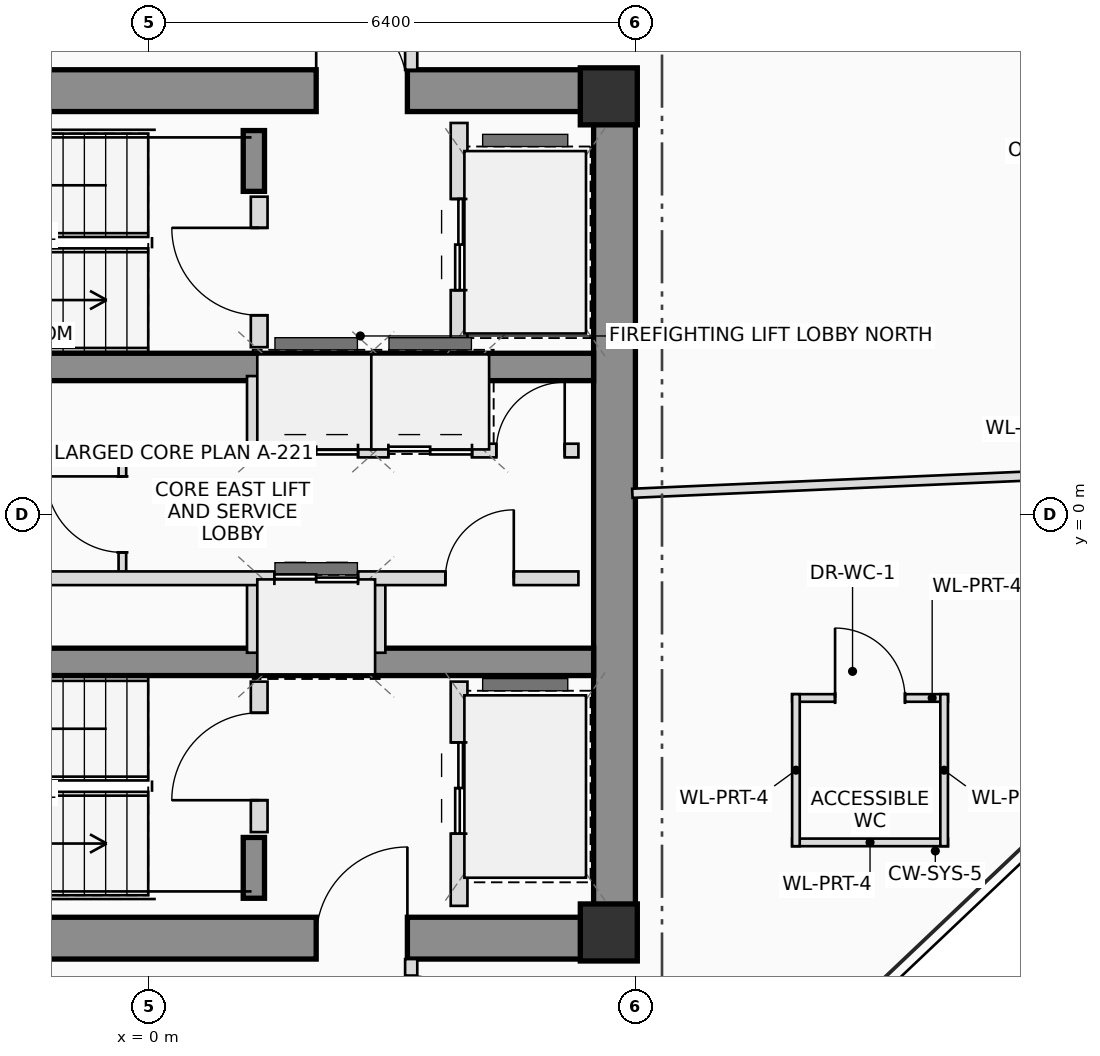
"""IFC4 building model, lengths in metres.
Left out: names, types, materials, properties, quantities, classifications, styles, units other than length and angle.
Written with IfcOpenShell. Run it as: python <this file> out.ifc"""

import sys

from ifc_helpers import new_model, si_unit, direction, frame, frame_2d, origin, origin_2d, place, context, subcontext, project, spatial, rectangle, extrude, source, transform, mapped, element, fill, save


model = new_model("IFC4")
c1 = context("Model", 3, precision=1e-05, world=origin(), true_north=direction((0.0, 1.0)))
c2 = subcontext(c1, "Body", "Model", "MODEL_VIEW")
j1 = project(units=[si_unit("LENGTHUNIT", "METRE"), si_unit("PLANEANGLEUNIT", "RADIAN")], contexts=[c1])
p1 = place(None, origin())
s1 = spatial("IfcSite", under=j1, at=p1, CompositionType="ELEMENT")
p2 = place(p1, origin())
s2 = spatial("IfcBuilding", under=s1, at=p2, CompositionType="ELEMENT")
p3 = place(p2, frame((0.0, 0.0, 224.15)))
s3 = spatial("IfcBuildingStorey", under=s2, at=p3, CompositionType="ELEMENT", Elevation=224.15)
m1 = source(origin(), c2, "Body", "SweptSolid", [
    extrude(rectangle(XDim=0.75, YDim=0.75, at=origin_2d()), origin(), (0.0, 0.0, 1.0), 4.5),
])
for number, where, z_axis, x_axis in (
    (1, (6.05, -5.5, 0.0), (0.0, 0.0, 1.0), (1.0, 0.0, 0.0)),
    (2, (6.05, 5.5, 0.0), (0.0, 0.0, 1.0), (1.0, 0.0, 0.0)),
):
    element("IfcColumn", number, at=place(p3, frame(where, z_axis=z_axis, x_axis=x_axis)), inside=s3, PredefinedType="COLUMN", context=c2, shape_type="MappedRepresentation", body=[
        mapped(m1, transform((0.0, 0.0, 0.0), scale=1.0)),
    ])
p4 = place(p3, frame((-6.4, 5.575, 0.0), z_axis=(0.0, 0.0, 1.0), x_axis=(1.0, 0.0, 0.0)))
e3 = element("IfcWall", 3, at=p4, inside=s3, PredefinedType="SHEAR", context=c2, shape_type="SweptSolid", body=[
    extrude(rectangle(XDim=12.8, YDim=0.55, at=frame_2d((6.4, 0.0))), origin(), (0.0, 0.0, 1.0), 4.5),
])
p5 = place(p4, frame((8.6, 0.0, 0.0)))
e4 = element("IfcOpeningElement", 4, at=p5, cuts=e3, PredefinedType="OPENING", context=c2, shape_type="SweptSolid", body=[
    extrude(rectangle(XDim=1.2, YDim=2.2, at=frame_2d((0.6, 1.1))), frame((0.0, 0.285, 0.0), z_axis=(0.0, -1.0, 0.0), x_axis=(1.0, 0.0, 0.0)), (0.0, 0.0, 1.0), 0.57),
])
p6 = place(p3, frame((-6.4, -5.575, 0.0), z_axis=(0.0, 0.0, 1.0), x_axis=(1.0, 0.0, 0.0)))
e5 = element("IfcWall", 5, at=p6, inside=s3, PredefinedType="SHEAR", context=c2, shape_type="SweptSolid", body=[
    extrude(rectangle(XDim=12.8, YDim=0.55, at=frame_2d((6.4, 0.0))), origin(), (0.0, 0.0, 1.0), 4.5),
])
p7 = place(p6, frame((8.6, 0.0, 0.0)))
e6 = element("IfcOpeningElement", 6, at=p7, cuts=e5, PredefinedType="OPENING", context=c2, shape_type="SweptSolid", body=[
    extrude(rectangle(XDim=1.2, YDim=2.2, at=frame_2d((0.6, 1.1))), frame((0.0, 0.285, 0.0), z_axis=(0.0, -1.0, 0.0), x_axis=(1.0, 0.0, 0.0)), (0.0, 0.0, 1.0), 0.57),
])
p8 = place(p3, frame((6.125, -5.3, 0.0), z_axis=(0.0, 0.0, 1.0), x_axis=(0.0, 1.0, 0.0)))
e7 = element("IfcWall", 7, at=p8, inside=s3, PredefinedType="SHEAR", context=c2, shape_type="SweptSolid", body=[
    extrude(rectangle(XDim=10.6, YDim=0.55, at=frame_2d((5.3, 0.0))), origin(), (0.0, 0.0, 1.0), 4.5),
])
for number, where, z_axis, x_axis in (
    (8, (-5.85, 1.94, 0.0), (0.0, 0.0, 1.0), (1.0, 0.0, 0.0)),
    (9, (-5.85, -1.94, 0.0), (0.0, 0.0, 1.0), (1.0, 0.0, 0.0)),
):
    element("IfcWall", number, at=place(p3, frame(where, z_axis=z_axis, x_axis=x_axis)), inside=s3, PredefinedType="SHEAR", context=c2, shape_type="SweptSolid", body=[
        extrude(rectangle(XDim=11.7, YDim=0.36, at=frame_2d((5.85, 0.0))), origin(), (0.0, 0.0, 1.0), 4.5),
    ])
for number, where, z_axis, x_axis in (
    (10, (1.38, 4.25, 0.0), (0.0, 0.0, 1.0), (0.0, 1.0, 0.0)),
    (11, (1.38, -5.05, 0.0), (0.0, 0.0, 1.0), (0.0, 1.0, 0.0)),
):
    element("IfcWall", number, at=place(p3, frame(where, z_axis=z_axis, x_axis=x_axis)), inside=s3, PredefinedType="SHEAR", context=c2, shape_type="SweptSolid", body=[
        extrude(rectangle(XDim=0.8, YDim=0.28, at=frame_2d((0.4, 0.0))), origin(), (0.0, 0.0, 1.0), 4.5),
    ])
p9 = place(p3, frame((1.45, 2.2, 0.0), z_axis=(0.0, 0.0, 1.0), x_axis=(0.0, 1.0, 0.0)))
e12 = element("IfcWall", 12, at=p9, inside=s3, PredefinedType="PLUMBINGWALL", context=c2, shape_type="SweptSolid", body=[
    extrude(rectangle(XDim=1.98, YDim=0.22, at=frame_2d((0.99, 0.0))), origin(), (0.0, 0.0, 1.0), 4.3),
])
p10 = place(p9, frame((0.42, 0.0, 0.0)))
e13 = element("IfcOpeningElement", 13, at=p10, cuts=e12, PredefinedType="OPENING", context=c2, shape_type="SweptSolid", body=[
    extrude(rectangle(XDim=1.15, YDim=2.15, at=frame_2d((0.575, 1.075))), frame((0.0, 0.12, 0.0), z_axis=(0.0, -1.0, 0.0), x_axis=(1.0, 0.0, 0.0)), (0.0, 0.0, 1.0), 0.24),
])
p11 = place(p3, frame((4.08, 2.2, 0.0), z_axis=(0.0, 0.0, 1.0), x_axis=(0.0, 1.0, 0.0)))
e14 = element("IfcWall", 14, at=p11, inside=s3, PredefinedType="PLUMBINGWALL", context=c2, shape_type="SweptSolid", body=[
    extrude(rectangle(XDim=2.95, YDim=0.22, at=frame_2d((1.475, 0.0))), origin(), (0.0, 0.0, 1.0), 4.3),
])
p12 = place(p11, frame((0.75, 0.0, 0.0)))
e15 = element("IfcOpeningElement", 15, at=p12, cuts=e14, PredefinedType="OPENING", context=c2, shape_type="SweptSolid", body=[
    extrude(rectangle(XDim=1.2, YDim=2.25, at=frame_2d((0.6, 1.125))), frame((0.0, 0.12, 0.0), z_axis=(0.0, -1.0, 0.0), x_axis=(1.0, 0.0, 0.0)), (0.0, 0.0, 1.0), 0.24),
])
p13 = place(p3, frame((1.45, -4.18, 0.0), z_axis=(0.0, 0.0, 1.0), x_axis=(0.0, 1.0, 0.0)))
e16 = element("IfcWall", 16, at=p13, inside=s3, PredefinedType="PLUMBINGWALL", context=c2, shape_type="SweptSolid", body=[
    extrude(rectangle(XDim=1.98, YDim=0.22, at=frame_2d((0.99, 0.0))), origin(), (0.0, 0.0, 1.0), 4.3),
])
p14 = place(p13, frame((0.42, 0.0, 0.0)))
e17 = element("IfcOpeningElement", 17, at=p14, cuts=e16, PredefinedType="OPENING", context=c2, shape_type="SweptSolid", body=[
    extrude(rectangle(XDim=1.15, YDim=2.15, at=frame_2d((0.575, 1.075))), frame((0.0, 0.12, 0.0), z_axis=(0.0, -1.0, 0.0), x_axis=(1.0, 0.0, 0.0)), (0.0, 0.0, 1.0), 0.24),
])
p15 = place(p3, frame((4.08, -5.15, 0.0), z_axis=(0.0, 0.0, 1.0), x_axis=(0.0, 1.0, 0.0)))
e18 = element("IfcWall", 18, at=p15, inside=s3, PredefinedType="PLUMBINGWALL", context=c2, shape_type="SweptSolid", body=[
    extrude(rectangle(XDim=2.95, YDim=0.22, at=frame_2d((1.475, 0.0))), origin(), (0.0, 0.0, 1.0), 4.3),
])
p16 = place(p15, frame((0.95, 0.0, 0.0)))
e19 = element("IfcOpeningElement", 19, at=p16, cuts=e18, PredefinedType="OPENING", context=c2, shape_type="SweptSolid", body=[
    extrude(rectangle(XDim=1.2, YDim=2.25, at=frame_2d((0.6, 1.125))), frame((0.0, 0.12, 0.0), z_axis=(0.0, -1.0, 0.0), x_axis=(1.0, 0.0, 0.0)), (0.0, 0.0, 1.0), 0.24),
])
p17 = place(p3, frame((-0.35, -0.84, 0.0), z_axis=(0.0, 0.0, 1.0), x_axis=(0.0, 1.0, 0.0)))
e20 = element("IfcWall", 20, at=p17, inside=s3, PredefinedType="PARTITIONING", context=c2, shape_type="SweptSolid", body=[
    extrude(rectangle(XDim=1.68, YDim=0.1, at=frame_2d((0.84, 0.0))), origin(), (0.0, 0.0, 1.0), 4.3),
])
p18 = place(p17, frame((0.34, 0.0, 0.0)))
e21 = element("IfcOpeningElement", 21, at=p18, cuts=e20, PredefinedType="OPENING", context=c2, shape_type="SweptSolid", body=[
    extrude(rectangle(XDim=1.0, YDim=2.25, at=frame_2d((0.5, 1.125))), frame((0.0, 0.06, 0.0), z_axis=(0.0, -1.0, 0.0), x_axis=(1.0, 0.0, 0.0)), (0.0, 0.0, 1.0), 0.12),
])
for number, where, z_axis, x_axis in (
    (22, (1.38, 0.84, 0.0), (0.0, 0.0, 1.0), (0.0, 1.0, 0.0)),
    (23, (1.38, -1.82, 0.0), (0.0, 0.0, 1.0), (0.0, 1.0, 0.0)),
    (24, (3.02, 0.84, 0.0), (0.0, 0.0, 1.0), (0.0, 1.0, 0.0)),
    (25, (4.38, 0.84, 0.0), (0.0, 0.0, 1.0), (0.0, 1.0, 0.0)),
    (26, (3.02, -1.82, 0.0), (0.0, 0.0, 1.0), (0.0, 1.0, 0.0)),
):
    element("IfcWall", number, at=place(p3, frame(where, z_axis=z_axis, x_axis=x_axis)), inside=s3, PredefinedType="PLUMBINGWALL", context=c2, shape_type="SweptSolid", body=[
        extrude(rectangle(XDim=0.98, YDim=0.18, at=frame_2d((0.49, 0.0))), origin(), (0.0, 0.0, 1.0), 4.3),
    ])
p19 = place(p3, frame((-5.68, 0.84, 0.0), z_axis=(0.0, 0.0, 1.0), x_axis=(1.0, 0.0, 0.0)))
e27 = element("IfcWall", 27, at=p19, inside=s3, PredefinedType="PLUMBINGWALL", context=c2, shape_type="SweptSolid", body=[
    extrude(rectangle(XDim=11.33, YDim=0.18, at=frame_2d((5.665, 0.0))), origin(), (0.0, 0.0, 1.0), 4.3),
])
p20 = place(p19, frame((3.13, 0.0, 0.0)))
e28 = element("IfcOpeningElement", 28, at=p20, cuts=e27, PredefinedType="OPENING", context=c2, shape_type="SweptSolid", body=[
    extrude(rectangle(XDim=0.9, YDim=2.05, at=frame_2d((0.45, 1.025))), frame((0.0, 0.1, 0.0), z_axis=(0.0, -1.0, 0.0), x_axis=(1.0, 0.0, 0.0)), (0.0, 0.0, 1.0), 0.2),
])
p21 = place(p19, frame((7.33, 0.0, 0.0)))
e29 = element("IfcOpeningElement", 29, at=p21, cuts=e27, PredefinedType="OPENING", context=c2, shape_type="SweptSolid", body=[
    extrude(rectangle(XDim=1.1, YDim=2.2, at=frame_2d((0.55, 1.1))), frame((0.0, 0.1, 0.0), z_axis=(0.0, -1.0, 0.0), x_axis=(1.0, 0.0, 0.0)), (0.0, 0.0, 1.0), 0.2),
])
p22 = place(p19, frame((8.83, 0.0, 0.0)))
e30 = element("IfcOpeningElement", 30, at=p22, cuts=e27, PredefinedType="OPENING", context=c2, shape_type="SweptSolid", body=[
    extrude(rectangle(XDim=1.1, YDim=2.2, at=frame_2d((0.55, 1.1))), frame((0.0, 0.1, 0.0), z_axis=(0.0, -1.0, 0.0), x_axis=(1.0, 0.0, 0.0)), (0.0, 0.0, 1.0), 0.2),
])
p23 = place(p19, frame((10.25, 0.0, 0.0)))
e31 = element("IfcOpeningElement", 31, at=p23, cuts=e27, PredefinedType="OPENING", context=c2, shape_type="SweptSolid", body=[
    extrude(rectangle(XDim=0.9, YDim=2.05, at=frame_2d((0.45, 1.025))), frame((0.0, 0.1, 0.0), z_axis=(0.0, -1.0, 0.0), x_axis=(1.0, 0.0, 0.0)), (0.0, 0.0, 1.0), 0.2),
])
p24 = place(p3, frame((-5.68, -0.84, 0.0), z_axis=(0.0, 0.0, 1.0), x_axis=(1.0, 0.0, 0.0)))
e32 = element("IfcWall", 32, at=p24, inside=s3, PredefinedType="PLUMBINGWALL", context=c2, shape_type="SweptSolid", body=[
    extrude(rectangle(XDim=11.33, YDim=0.18, at=frame_2d((5.665, 0.0))), origin(), (0.0, 0.0, 1.0), 4.3),
])
p25 = place(p24, frame((3.13, 0.0, 0.0)))
e33 = element("IfcOpeningElement", 33, at=p25, cuts=e32, PredefinedType="OPENING", context=c2, shape_type="SweptSolid", body=[
    extrude(rectangle(XDim=0.9, YDim=2.05, at=frame_2d((0.45, 1.025))), frame((0.0, 0.1, 0.0), z_axis=(0.0, -1.0, 0.0), x_axis=(1.0, 0.0, 0.0)), (0.0, 0.0, 1.0), 0.2),
])
p26 = place(p24, frame((7.33, 0.0, 0.0)))
e34 = element("IfcOpeningElement", 34, at=p26, cuts=e32, PredefinedType="OPENING", context=c2, shape_type="SweptSolid", body=[
    extrude(rectangle(XDim=1.1, YDim=2.2, at=frame_2d((0.55, 1.1))), frame((0.0, 0.1, 0.0), z_axis=(0.0, -1.0, 0.0), x_axis=(1.0, 0.0, 0.0)), (0.0, 0.0, 1.0), 0.2),
])
p27 = place(p24, frame((9.58, 0.0, 0.0)))
e35 = element("IfcOpeningElement", 35, at=p27, cuts=e32, PredefinedType="OPENING", context=c2, shape_type="SweptSolid", body=[
    extrude(rectangle(XDim=0.9, YDim=2.05, at=frame_2d((0.45, 1.025))), frame((0.0, 0.1, 0.0), z_axis=(0.0, -1.0, 0.0), x_axis=(1.0, 0.0, 0.0)), (0.0, 0.0, 1.0), 0.2),
])
p28 = place(p3, frame((8.462, -2.415, 0.0), z_axis=(0.0, 0.0, 1.0), x_axis=(1.0, 0.0, 0.0)))
e36 = element("IfcWall", 36, at=p28, inside=s3, PredefinedType="PARTITIONING", context=c2, shape_type="SweptSolid", body=[
    extrude(rectangle(XDim=2.05, YDim=0.1, at=frame_2d((1.025, 0.0))), origin(), (0.0, 0.0, 1.0), 3.705),
])
p29 = place(p28, frame((0.565, 0.0, 0.0)))
e37 = element("IfcOpeningElement", 37, at=p29, cuts=e36, PredefinedType="OPENING", context=c2, shape_type="SweptSolid", body=[
    extrude(rectangle(XDim=0.92, YDim=2.1, at=frame_2d((0.46, 1.05))), frame((0.0, 0.06, 0.0), z_axis=(0.0, -1.0, 0.0), x_axis=(1.0, 0.0, 0.0)), (0.0, 0.0, 1.0), 0.12),
])
p30 = place(p3, frame((10.512, -4.315, 0.0), z_axis=(0.0, 0.0, 1.0), x_axis=(-1.0, 0.0, 0.0)))
e38 = element("IfcWall", 38, at=p30, inside=s3, PredefinedType="PARTITIONING", context=c2, shape_type="SweptSolid", body=[
    extrude(rectangle(XDim=2.05, YDim=0.1, at=frame_2d((1.025, 0.0))), origin(), (0.0, 0.0, 1.0), 3.705),
])
for number, where, z_axis, x_axis in (
    (39, (10.462, -2.365, 0.0), (0.0, 0.0, 1.0), (0.0, -1.0, 0.0)),
    (40, (8.512, -4.365, 0.0), (0.0, 0.0, 1.0), (0.0, 1.0, 0.0)),
):
    element("IfcWall", number, at=place(p3, frame(where, z_axis=z_axis, x_axis=x_axis)), inside=s3, PredefinedType="PARTITIONING", context=c2, shape_type="SweptSolid", body=[
        extrude(rectangle(XDim=2.0, YDim=0.1, at=frame_2d((1.0, 0.0))), origin(), (0.0, 0.0, 1.0), 3.705),
    ])
p31 = place(p3, frame((3.45, 7.49, 0.0), z_axis=(0.0, 0.0, 1.0), x_axis=(0.0, -1.0, 0.0)))
e41 = element("IfcWall", 41, at=p31, inside=s3, PredefinedType="PARTITIONING", context=c2, shape_type="SweptSolid", body=[
    extrude(rectangle(XDim=1.64, YDim=0.16, at=frame_2d((0.82, 0.0))), origin(), (0.0, 0.0, 1.0), 4.3),
])
p32 = place(p3, frame((3.45, -5.85, 0.0), z_axis=(0.0, 0.0, 1.0), x_axis=(0.0, -1.0, 0.0)))
e42 = element("IfcWall", 42, at=p32, inside=s3, PredefinedType="PARTITIONING", context=c2, shape_type="SweptSolid", body=[
    extrude(rectangle(XDim=1.64, YDim=0.16, at=frame_2d((0.82, 0.0))), origin(), (0.0, 0.0, 1.0), 4.3),
])
p33 = place(p32, frame((0.22, 0.0, 0.0)))
e43 = element("IfcOpeningElement", 43, at=p33, cuts=e42, PredefinedType="OPENING", context=c2, shape_type="SweptSolid", body=[
    extrude(rectangle(XDim=1.0, YDim=2.25, at=frame_2d((0.5, 1.125))), frame((0.0, 0.09, 0.0), z_axis=(0.0, -1.0, 0.0), x_axis=(1.0, 0.0, 0.0)), (0.0, 0.0, 1.0), 0.18),
])
p34 = place(p3, frame((6.36, 0.278, 0.0), z_axis=(0.0, 0.0, 1.0), x_axis=(0.999047873507, 0.043627358851, 0.0)))
e44 = element("IfcWall", 44, at=p34, inside=s3, PredefinedType="PARTITIONING", context=c2, shape_type="SweptSolid", body=[
    extrude(rectangle(XDim=10.476, YDim=0.12, at=frame_2d((5.238, 0.0))), origin(), (0.0, 0.0, 1.0), 3.705),
])
p35 = place(p5, origin())
e45 = element("IfcDoor", 45, at=p35, inside=s3, OperationType="SINGLE_SWING_LEFT", PredefinedType="DOOR", context=c2, shape_type="SweptSolid", body=[
    extrude(rectangle(XDim=1.2, YDim=2.2, at=frame_2d((0.6, 1.1))), frame((0.0, 0.025, 0.0), z_axis=(0.0, -1.0, 0.0), x_axis=(1.0, 0.0, 0.0)), (0.0, 0.0, 1.0), 0.05),
])
fill(e4, e45)
p36 = place(p7, origin())
e46 = element("IfcDoor", 46, at=p36, inside=s3, OperationType="SINGLE_SWING_RIGHT", PredefinedType="DOOR", context=c2, shape_type="SweptSolid", body=[
    extrude(rectangle(XDim=1.2, YDim=2.2, at=frame_2d((0.6, 1.1))), frame((0.0, 0.025, 0.0), z_axis=(0.0, -1.0, 0.0), x_axis=(1.0, 0.0, 0.0)), (0.0, 0.0, 1.0), 0.05),
])
fill(e6, e46)
p37 = place(p10, origin())
e47 = element("IfcDoor", 47, at=p37, inside=s3, OperationType="SINGLE_SWING_RIGHT", PredefinedType="DOOR", context=c2, shape_type="SweptSolid", body=[
    extrude(rectangle(XDim=1.15, YDim=2.15, at=frame_2d((0.575, 1.075))), frame((0.0, 0.025, 0.0), z_axis=(0.0, -1.0, 0.0), x_axis=(1.0, 0.0, 0.0)), (0.0, 0.0, 1.0), 0.05),
])
fill(e13, e47)
p38 = place(p12, origin())
e48 = element("IfcDoor", 48, at=p38, inside=s3, OperationType="DOUBLE_DOOR_SLIDING", PredefinedType="DOOR", context=c2, shape_type="SweptSolid", body=[
    extrude(rectangle(XDim=1.2, YDim=2.25, at=frame_2d((0.6, 1.125))), frame((0.0, 0.025, 0.0), z_axis=(0.0, -1.0, 0.0), x_axis=(1.0, 0.0, 0.0)), (0.0, 0.0, 1.0), 0.05),
])
fill(e15, e48)
p39 = place(p14, origin())
e49 = element("IfcDoor", 49, at=p39, inside=s3, OperationType="SINGLE_SWING_LEFT", PredefinedType="DOOR", context=c2, shape_type="SweptSolid", body=[
    extrude(rectangle(XDim=1.15, YDim=2.15, at=frame_2d((0.575, 1.075))), frame((0.0, 0.025, 0.0), z_axis=(0.0, -1.0, 0.0), x_axis=(1.0, 0.0, 0.0)), (0.0, 0.0, 1.0), 0.05),
])
fill(e17, e49)
p40 = place(p16, origin())
e50 = element("IfcDoor", 50, at=p40, inside=s3, OperationType="DOUBLE_DOOR_SLIDING", PredefinedType="DOOR", context=c2, shape_type="SweptSolid", body=[
    extrude(rectangle(XDim=1.2, YDim=2.25, at=frame_2d((0.6, 1.125))), frame((0.0, 0.025, 0.0), z_axis=(0.0, -1.0, 0.0), x_axis=(1.0, 0.0, 0.0)), (0.0, 0.0, 1.0), 0.05),
])
fill(e19, e50)
p41 = place(p18, origin())
e51 = element("IfcDoor", 51, at=p41, inside=s3, OperationType="SINGLE_SWING_RIGHT", PredefinedType="DOOR", context=c2, shape_type="SweptSolid", body=[
    extrude(rectangle(XDim=1.0, YDim=2.25, at=frame_2d((0.5, 1.125))), frame((0.0, 0.025, 0.0), z_axis=(0.0, -1.0, 0.0), x_axis=(1.0, 0.0, 0.0)), (0.0, 0.0, 1.0), 0.05),
])
fill(e21, e51)
p42 = place(p21, origin())
e52 = element("IfcDoor", 52, at=p42, inside=s3, OperationType="DOUBLE_DOOR_SLIDING", PredefinedType="DOOR", context=c2, shape_type="SweptSolid", body=[
    extrude(rectangle(XDim=1.1, YDim=2.2, at=frame_2d((0.55, 1.1))), frame((0.0, 0.025, 0.0), z_axis=(0.0, -1.0, 0.0), x_axis=(1.0, 0.0, 0.0)), (0.0, 0.0, 1.0), 0.05),
])
fill(e29, e52)
p43 = place(p22, origin())
e53 = element("IfcDoor", 53, at=p43, inside=s3, OperationType="DOUBLE_DOOR_SLIDING", PredefinedType="DOOR", context=c2, shape_type="SweptSolid", body=[
    extrude(rectangle(XDim=1.1, YDim=2.2, at=frame_2d((0.55, 1.1))), frame((0.0, 0.025, 0.0), z_axis=(0.0, -1.0, 0.0), x_axis=(1.0, 0.0, 0.0)), (0.0, 0.0, 1.0), 0.05),
])
fill(e30, e53)
p44 = place(p23, origin())
e54 = element("IfcDoor", 54, at=p44, inside=s3, OperationType="SINGLE_SWING_RIGHT", PredefinedType="DOOR", context=c2, shape_type="SweptSolid", body=[
    extrude(rectangle(XDim=0.9, YDim=2.05, at=frame_2d((0.45, 1.025))), frame((0.0, 0.025, 0.0), z_axis=(0.0, -1.0, 0.0), x_axis=(1.0, 0.0, 0.0)), (0.0, 0.0, 1.0), 0.05),
])
fill(e31, e54)
p45 = place(p26, origin())
e55 = element("IfcDoor", 55, at=p45, inside=s3, OperationType="DOUBLE_DOOR_SLIDING", PredefinedType="DOOR", context=c2, shape_type="SweptSolid", body=[
    extrude(rectangle(XDim=1.1, YDim=2.2, at=frame_2d((0.55, 1.1))), frame((0.0, 0.025, 0.0), z_axis=(0.0, -1.0, 0.0), x_axis=(1.0, 0.0, 0.0)), (0.0, 0.0, 1.0), 0.05),
])
fill(e34, e55)
p46 = place(p27, origin())
e56 = element("IfcDoor", 56, at=p46, inside=s3, OperationType="SINGLE_SWING_RIGHT", PredefinedType="DOOR", context=c2, shape_type="SweptSolid", body=[
    extrude(rectangle(XDim=0.9, YDim=2.05, at=frame_2d((0.45, 1.025))), frame((0.0, 0.025, 0.0), z_axis=(0.0, -1.0, 0.0), x_axis=(1.0, 0.0, 0.0)), (0.0, 0.0, 1.0), 0.05),
])
fill(e35, e56)
p47 = place(p29, origin())
e57 = element("IfcDoor", 57, at=p47, inside=s3, OperationType="SINGLE_SWING_LEFT", PredefinedType="DOOR", context=c2, shape_type="SweptSolid", body=[
    extrude(rectangle(XDim=0.92, YDim=2.1, at=frame_2d((0.46, 1.05))), frame((0.0, 0.025, 0.0), z_axis=(0.0, -1.0, 0.0), x_axis=(1.0, 0.0, 0.0)), (0.0, 0.0, 1.0), 0.05),
])
fill(e37, e57)
p48 = place(p33, origin())
e58 = element("IfcDoor", 58, at=p48, inside=s3, OperationType="SINGLE_SWING_RIGHT", PredefinedType="DOOR", context=c2, shape_type="SweptSolid", body=[
    extrude(rectangle(XDim=1.0, YDim=2.25, at=frame_2d((0.5, 1.125))), frame((0.0, 0.025, 0.0), z_axis=(0.0, -1.0, 0.0), x_axis=(1.0, 0.0, 0.0)), (0.0, 0.0, 1.0), 0.05),
])
fill(e43, e58)
save(model, sys.argv[1])
